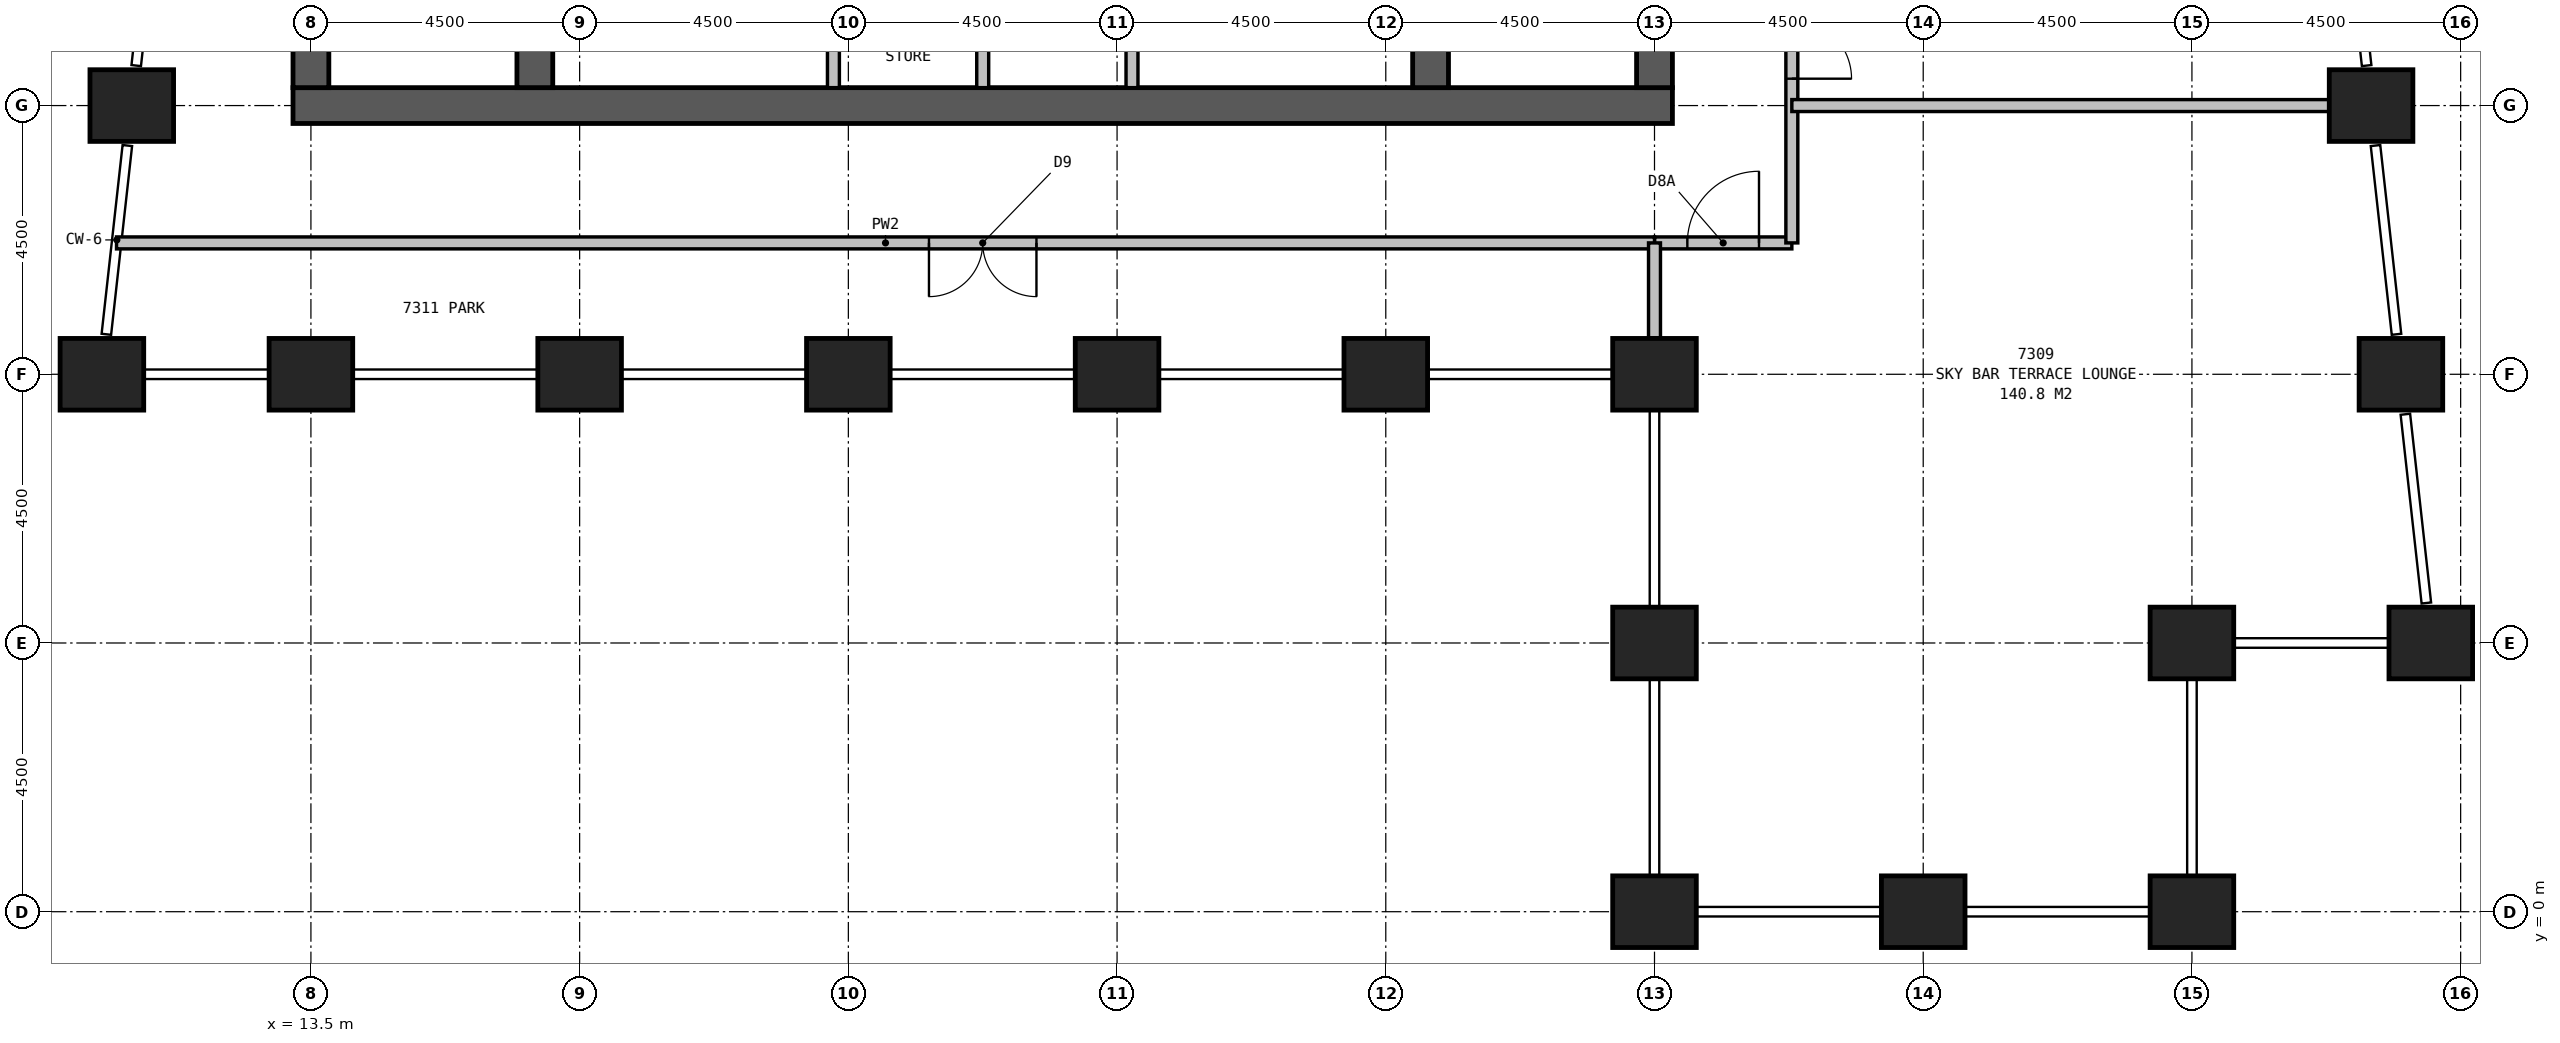
"""IFC4 building model, lengths in metres.
Left out: names, types, materials, properties, quantities, classifications, styles, units other than length and angle.
Written with IfcOpenShell. Run it as: python <this file> out.ifc"""

import sys

from ifc_helpers import new_model, si_unit, direction, frame, frame_2d, origin, origin_2d, place, context, subcontext, project, spatial, rectangle, extrude, element, fill, save


model = new_model("IFC4")
c1 = context("Model", 3, precision=1e-05, world=origin(), true_north=direction((0.0, 1.0)))
c2 = subcontext(c1, "Body", "Model", "MODEL_VIEW")
j1 = project(units=[si_unit("LENGTHUNIT", "METRE"), si_unit("PLANEANGLEUNIT", "RADIAN")], contexts=[c1])
p1 = place(None, origin())
s1 = spatial("IfcSite", under=j1, at=p1, CompositionType="ELEMENT")
p2 = place(p1, origin())
s2 = spatial("IfcBuilding", under=s1, at=p2, CompositionType="ELEMENT")
p3 = place(p2, frame((0.0, 0.0, 285.8)))
s3 = spatial("IfcBuildingStorey", under=s2, at=p3, CompositionType="ELEMENT", Elevation=285.8)
for number, where, z_axis, x_axis in (
    (1, (10.0, 9.0, 0.0), (0.0, 0.0, 1.0), (1.0, 0.0, 0.0)),
    (2, (13.5, 9.0, 0.0), (0.0, 0.0, 1.0), (1.0, 0.0, 0.0)),
    (3, (18.0, 9.0, 0.0), (0.0, 0.0, 1.0), (1.0, 0.0, 0.0)),
    (4, (22.5, 9.0, 0.0), (0.0, 0.0, 1.0), (1.0, 0.0, 0.0)),
    (5, (27.0, 9.0, 0.0), (0.0, 0.0, 1.0), (1.0, 0.0, 0.0)),
    (6, (31.5, 9.0, 0.0), (0.0, 0.0, 1.0), (1.0, 0.0, 0.0)),
    (7, (36.0, 9.0, 0.0), (0.0, 0.0, 1.0), (1.0, 0.0, 0.0)),
    (8, (36.0, 4.5, 0.0), (0.0, 0.0, 1.0), (1.0, 0.0, 0.0)),
    (9, (36.0, 0.0, 0.0), (0.0, 0.0, 1.0), (1.0, 0.0, 0.0)),
    (10, (40.5, 0.0, 0.0), (0.0, 0.0, 1.0), (1.0, 0.0, 0.0)),
    (11, (45.0, 0.0, 0.0), (0.0, 0.0, 1.0), (1.0, 0.0, 0.0)),
    (12, (45.0, 4.5, 0.0), (0.0, 0.0, 1.0), (1.0, 0.0, 0.0)),
    (13, (49.0, 4.5, 0.0), (0.0, 0.0, 1.0), (1.0, 0.0, 0.0)),
    (14, (48.5, 9.0, 0.0), (0.0, 0.0, 1.0), (1.0, 0.0, 0.0)),
    (15, (48.0, 13.5, 0.0), (0.0, 0.0, 1.0), (1.0, 0.0, 0.0)),
    (16, (10.5, 13.5, 0.0), (0.0, 0.0, 1.0), (1.0, 0.0, 0.0)),
):
    element("IfcColumn", number, at=place(p3, frame(where, z_axis=z_axis, x_axis=x_axis)), inside=s3, PredefinedType="COLUMN", context=c2, shape_type="SweptSolid", body=[
        extrude(rectangle(XDim=1.4, YDim=1.2, at=origin_2d()), origin(), (0.0, 0.0, 1.0), 3.9),
    ])
p4 = place(p3, frame((13.2, 13.5, 0.0), z_axis=(0.0, 0.0, 1.0), x_axis=(1.0, 0.0, 0.0)))
e17 = element("IfcWall", 17, at=p4, inside=s3, PredefinedType="SHEAR", context=c2, shape_type="SweptSolid", body=[
    extrude(rectangle(XDim=23.1, YDim=0.6, at=frame_2d((11.55, 0.0))), origin(), (0.0, 0.0, 1.0), 3.9),
])
p5 = place(p3, frame((17.25, 13.8, 0.0), z_axis=(0.0, 0.0, 1.0), x_axis=(0.0, 1.0, 0.0)))
e18 = element("IfcWall", 18, at=p5, inside=s3, PredefinedType="SHEAR", context=c2, shape_type="SweptSolid", body=[
    extrude(rectangle(XDim=12.9, YDim=0.6, at=frame_2d((6.45, 0.0))), origin(), (0.0, 0.0, 1.0), 3.9),
])
p6 = place(p5, frame((3.85, 0.0, 0.0)))
e19 = element("IfcOpeningElement", 19, at=p6, cuts=e18, PredefinedType="OPENING", context=c2, shape_type="SweptSolid", body=[
    extrude(rectangle(XDim=1.2, YDim=2.1, at=frame_2d((0.6, 1.05))), frame((0.0, 0.31, 0.0), z_axis=(0.0, -1.0, 0.0), x_axis=(1.0, 0.0, 0.0)), (0.0, 0.0, 1.0), 0.62),
])
p7 = place(p3, frame((32.25, 13.8, 0.0), z_axis=(0.0, 0.0, 1.0), x_axis=(0.0, 1.0, 0.0)))
e20 = element("IfcWall", 20, at=p7, inside=s3, PredefinedType="SHEAR", context=c2, shape_type="SweptSolid", body=[
    extrude(rectangle(XDim=12.9, YDim=0.6, at=frame_2d((6.45, 0.0))), origin(), (0.0, 0.0, 1.0), 3.9),
])
p8 = place(p7, frame((5.05, 0.0, 0.0), z_axis=(0.0, 0.0, 1.0), x_axis=(-1.0, 0.0, 0.0)))
e21 = element("IfcOpeningElement", 21, at=p8, cuts=e20, PredefinedType="OPENING", context=c2, shape_type="SweptSolid", body=[
    extrude(rectangle(XDim=1.2, YDim=2.1, at=frame_2d((0.6, 1.05))), frame((0.0, 0.31, 0.0), z_axis=(0.0, -1.0, 0.0), x_axis=(1.0, 0.0, 0.0)), (0.0, 0.0, 1.0), 0.62),
])
for number, where, z_axis, x_axis in (
    (22, (13.5, 16.5, 0.0), (0.0, 0.0, 1.0), (0.0, -1.0, 0.0)),
    (23, (36.0, 13.8, 0.0), (0.0, 0.0, 1.0), (0.0, 1.0, 0.0)),
):
    element("IfcWall", number, at=place(p3, frame(where, z_axis=z_axis, x_axis=x_axis)), inside=s3, PredefinedType="SHEAR", context=c2, shape_type="SweptSolid", body=[
        extrude(rectangle(XDim=2.7, YDim=0.6, at=frame_2d((1.35, 0.0))), origin(), (0.0, 0.0, 1.0), 3.9),
    ])
p9 = place(p3, frame((36.0, 11.2, 0.0), z_axis=(0.0, 0.0, 1.0), x_axis=(1.0, 0.0, 0.0)))
e24 = element("IfcWall", 24, at=p9, inside=s3, PredefinedType="PARTITIONING", context=c2, shape_type="SweptSolid", body=[
    extrude(rectangle(XDim=2.3, YDim=0.2, at=frame_2d((1.15, 0.0))), origin(), (0.0, 0.0, 1.0), 3.65),
])
p10 = place(p9, frame((0.55, 0.0, 0.0)))
e25 = element("IfcOpeningElement", 25, at=p10, cuts=e24, PredefinedType="OPENING", context=c2, shape_type="SweptSolid", body=[
    extrude(rectangle(XDim=1.2, YDim=2.1, at=frame_2d((0.6, 1.05))), frame((0.0, 0.11, 0.0), z_axis=(0.0, -1.0, 0.0), x_axis=(1.0, 0.0, 0.0)), (0.0, 0.0, 1.0), 0.22),
])
p11 = place(p3, frame((38.3, 11.2, 0.0), z_axis=(0.0, 0.0, 1.0), x_axis=(0.0, 1.0, 0.0)))
e26 = element("IfcWall", 26, at=p11, inside=s3, PredefinedType="PARTITIONING", context=c2, shape_type="SweptSolid", body=[
    extrude(rectangle(XDim=18.1, YDim=0.2, at=frame_2d((9.05, 0.0))), origin(), (0.0, 0.0, 1.0), 3.65),
])
p12 = place(p11, frame((3.75, 0.0, 0.0), z_axis=(0.0, 0.0, 1.0), x_axis=(-1.0, 0.0, 0.0)))
e27 = element("IfcOpeningElement", 27, at=p12, cuts=e26, PredefinedType="OPENING", context=c2, shape_type="SweptSolid", body=[
    extrude(rectangle(XDim=1.0, YDim=2.1, at=frame_2d((0.5, 1.05))), frame((0.0, 0.11, 0.0), z_axis=(0.0, -1.0, 0.0), x_axis=(1.0, 0.0, 0.0)), (0.0, 0.0, 1.0), 0.22),
])
p13 = place(p11, frame((9.05, 0.0, 0.0), z_axis=(0.0, 0.0, 1.0), x_axis=(-1.0, 0.0, 0.0)))
e28 = element("IfcOpeningElement", 28, at=p13, cuts=e26, PredefinedType="OPENING", context=c2, shape_type="SweptSolid", body=[
    extrude(rectangle(XDim=1.8, YDim=2.4, at=frame_2d((0.9, 1.2))), frame((0.0, 0.11, 0.0), z_axis=(0.0, -1.0, 0.0), x_axis=(1.0, 0.0, 0.0)), (0.0, 0.0, 1.0), 0.22),
])
p14 = place(p3, frame((36.0, 11.2, 0.0), z_axis=(0.0, 0.0, 1.0), x_axis=(0.0, -1.0, 0.0)))
e29 = element("IfcWall", 29, at=p14, inside=s3, PredefinedType="PARTITIONING", context=c2, shape_type="SweptSolid", body=[
    extrude(rectangle(XDim=1.59, YDim=0.2, at=frame_2d((0.795, 0.0))), origin(), (0.0, 0.0, 1.0), 2.6),
])
p15 = place(p3, frame((38.3, 13.5, 0.0), z_axis=(0.0, 0.0, 1.0), x_axis=(1.0, 0.0, 0.0)))
e30 = element("IfcWall", 30, at=p15, inside=s3, PredefinedType="PARTITIONING", context=c2, shape_type="SweptSolid", body=[
    extrude(rectangle(XDim=8.999, YDim=0.2, at=frame_2d((4.5, 0.0))), origin(), (0.0, 0.0, 1.0), 2.3),
])
p16 = place(p3, frame((10.244, 11.2, 0.0), z_axis=(0.0, 0.0, 1.0), x_axis=(1.0, 0.0, 0.0)))
e31 = element("IfcWall", 31, at=p16, inside=s3, PredefinedType="PARTITIONING", context=c2, shape_type="SweptSolid", body=[
    extrude(rectangle(XDim=25.756, YDim=0.2, at=frame_2d((12.878, 0.0))), origin(), (0.0, 0.0, 1.0), 3.65),
])
p17 = place(p16, frame((15.406, 0.0, 0.0), z_axis=(0.0, 0.0, 1.0), x_axis=(-1.0, 0.0, 0.0)))
e32 = element("IfcOpeningElement", 32, at=p17, cuts=e31, PredefinedType="OPENING", context=c2, shape_type="SweptSolid", body=[
    extrude(rectangle(XDim=1.8, YDim=2.4, at=frame_2d((0.9, 1.2))), frame((0.0, 0.11, 0.0), z_axis=(0.0, -1.0, 0.0), x_axis=(1.0, 0.0, 0.0)), (0.0, 0.0, 1.0), 0.22),
])
for number, where, z_axis, x_axis in (
    (33, (22.25, 13.8, 0.0), (0.0, 0.0, 1.0), (0.0, 1.0, 0.0)),
    (34, (24.75, 13.8, 0.0), (0.0, 0.0, 1.0), (0.0, 1.0, 0.0)),
    (35, (27.25, 13.8, 0.0), (0.0, 0.0, 1.0), (0.0, 1.0, 0.0)),
):
    element("IfcWall", number, at=place(p3, frame(where, z_axis=z_axis, x_axis=x_axis)), inside=s3, PredefinedType="PARTITIONING", context=c2, shape_type="SweptSolid", body=[
        extrude(rectangle(XDim=2.4, YDim=0.2, at=frame_2d((1.2, 0.0))), origin(), (0.0, 0.0, 1.0), 3.65),
    ])
p18 = place(p10, origin())
e36 = element("IfcDoor", 36, at=p18, inside=s3, OperationType="SINGLE_SWING_RIGHT", PredefinedType="DOOR", context=c2, shape_type="SweptSolid", body=[
    extrude(rectangle(XDim=1.2, YDim=2.1, at=frame_2d((0.6, 1.05))), frame((0.0, 0.025, 0.0), z_axis=(0.0, -1.0, 0.0), x_axis=(1.0, 0.0, 0.0)), (0.0, 0.0, 1.0), 0.05),
])
fill(e25, e36)
p19 = place(p12, origin())
e37 = element("IfcDoor", 37, at=p19, inside=s3, OperationType="SINGLE_SWING_RIGHT", PredefinedType="DOOR", context=c2, shape_type="SweptSolid", body=[
    extrude(rectangle(XDim=1.0, YDim=2.1, at=frame_2d((0.5, 1.05))), frame((0.0, 0.025, 0.0), z_axis=(0.0, -1.0, 0.0), x_axis=(1.0, 0.0, 0.0)), (0.0, 0.0, 1.0), 0.05),
])
fill(e27, e37)
p20 = place(p17, origin())
e38 = element("IfcDoor", 38, at=p20, inside=s3, OperationType="DOUBLE_DOOR_SINGLE_SWING", PredefinedType="DOOR", context=c2, shape_type="SweptSolid", body=[
    extrude(rectangle(XDim=1.8, YDim=2.4, at=frame_2d((0.9, 1.2))), frame((0.0, 0.025, 0.0), z_axis=(0.0, -1.0, 0.0), x_axis=(1.0, 0.0, 0.0)), (0.0, 0.0, 1.0), 0.05),
])
fill(e32, e38)
save(model, sys.argv[1])
